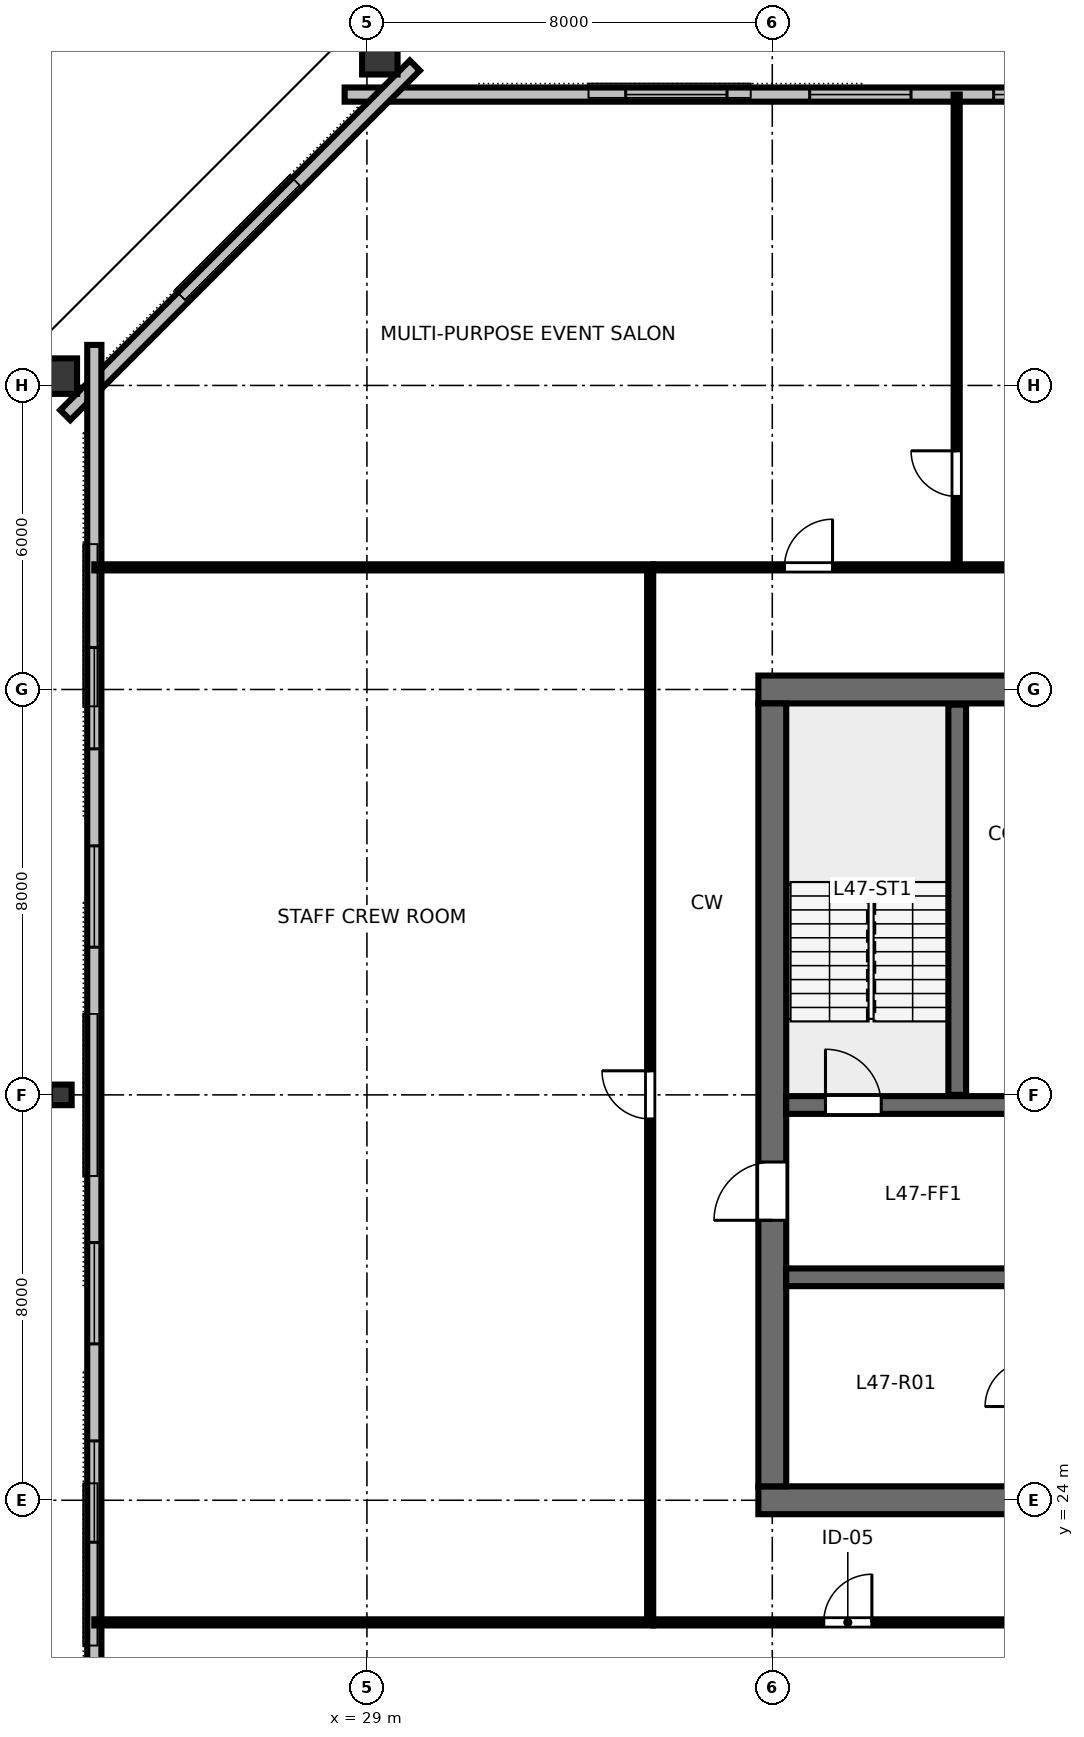
"""IFC4 building model, lengths in metres.
Left out: names, types, materials, properties, quantities, classifications, styles, units other than length and angle.
Written with IfcOpenShell. Run it as: python <this file> out.ifc"""

import sys

from ifc_helpers import new_model, si_unit, direction, frame, frame_2d, origin, origin_2d, place, context, subcontext, project, spatial, rectangle, hollow_rectangle, i_section, extrude, element, fill, save


model = new_model("IFC4")
c1 = context("Model", 3, precision=1e-05, world=origin(), true_north=direction((0.0, 1.0)))
c2 = subcontext(c1, "Body", "Model", "MODEL_VIEW")
j1 = project(units=[si_unit("LENGTHUNIT", "METRE"), si_unit("PLANEANGLEUNIT", "RADIAN")], contexts=[c1])
p1 = place(None, origin())
s1 = spatial("IfcSite", under=j1, at=p1, CompositionType="ELEMENT")
p2 = place(p1, origin())
s2 = spatial("IfcBuilding", under=s1, at=p2, CompositionType="ELEMENT")
p3 = place(p2, frame((0.0, 0.0, 180.6)))
s3 = spatial("IfcBuildingStorey", under=s2, at=p3, CompositionType="ELEMENT", Elevation=180.6)
p4 = place(p3, frame((36.725, 24.0, 0.0), z_axis=(0.0, 0.0, 1.0), x_axis=(1.0, 0.0, 0.0)))
e1 = element("IfcWall", 1, at=p4, inside=s3, PredefinedType="SHEAR", context=c2, shape_type="SweptSolid", body=[
    extrude(rectangle(XDim=18.55, YDim=0.55, at=frame_2d((9.275, 0.0))), origin(), (0.0, 0.0, 1.0), 3.36),
])
p5 = place(p4, frame((13.475, 0.0, 0.0)))
e2 = element("IfcOpeningElement", 2, at=p5, cuts=e1, PredefinedType="OPENING", context=c2, shape_type="SweptSolid", body=[
    extrude(rectangle(XDim=1.6, YDim=2.15, at=frame_2d((0.8, 1.075))), frame((0.0, 0.285, 0.0), z_axis=(0.0, -1.0, 0.0), x_axis=(1.0, 0.0, 0.0)), (0.0, 0.0, 1.0), 0.57),
])
p6 = place(p3, frame((36.725, 40.0, 0.0), z_axis=(0.0, 0.0, 1.0), x_axis=(1.0, 0.0, 0.0)))
e3 = element("IfcWall", 3, at=p6, inside=s3, PredefinedType="SHEAR", context=c2, shape_type="SweptSolid", body=[
    extrude(rectangle(XDim=18.55, YDim=0.55, at=frame_2d((9.275, 0.0))), origin(), (0.0, 0.0, 1.0), 3.36),
])
p7 = place(p6, frame((10.575, 0.0, 0.0)))
e4 = element("IfcOpeningElement", 4, at=p7, cuts=e3, PredefinedType="OPENING", context=c2, shape_type="SweptSolid", body=[
    extrude(rectangle(XDim=1.0, YDim=2.15, at=frame_2d((0.5, 1.075))), frame((0.0, 0.285, 0.0), z_axis=(0.0, -1.0, 0.0), x_axis=(1.0, 0.0, 0.0)), (0.0, 0.0, 1.0), 0.57),
])
p8 = place(p3, frame((37.0, 24.275, 0.0), z_axis=(0.0, 0.0, 1.0), x_axis=(0.0, 1.0, 0.0)))
e5 = element("IfcWall", 5, at=p8, inside=s3, PredefinedType="SHEAR", context=c2, shape_type="SweptSolid", body=[
    extrude(rectangle(XDim=15.45, YDim=0.55, at=frame_2d((7.725, 0.0))), origin(), (0.0, 0.0, 1.0), 3.36),
])
p9 = place(p8, frame((5.25, 0.0, 0.0)))
e6 = element("IfcOpeningElement", 6, at=p9, cuts=e5, PredefinedType="OPENING", context=c2, shape_type="SweptSolid", body=[
    extrude(rectangle(XDim=1.15, YDim=2.15, at=frame_2d((0.575, 1.075))), frame((0.0, 0.285, 0.0), z_axis=(0.0, -1.0, 0.0), x_axis=(1.0, 0.0, 0.0)), (0.0, 0.0, 1.0), 0.57),
])
p10 = place(p3, frame((37.275, 31.8, 0.0), z_axis=(0.0, 0.0, 1.0), x_axis=(1.0, 0.0, 0.0)))
e7 = element("IfcWall", 7, at=p10, inside=s3, PredefinedType="SHEAR", context=c2, shape_type="SweptSolid", body=[
    extrude(rectangle(XDim=17.45, YDim=0.35, at=frame_2d((8.725, 0.0))), origin(), (0.0, 0.0, 1.0), 3.36),
])
p11 = place(p10, frame((0.775, 0.0, 0.0)))
e8 = element("IfcOpeningElement", 8, at=p11, cuts=e7, PredefinedType="OPENING", context=c2, shape_type="SweptSolid", body=[
    extrude(rectangle(XDim=1.1, YDim=2.15, at=frame_2d((0.55, 1.075))), frame((0.0, 0.185, 0.0), z_axis=(0.0, -1.0, 0.0), x_axis=(1.0, 0.0, 0.0)), (0.0, 0.0, 1.0), 0.37),
])
p12 = place(p10, frame((14.675, 0.0, 0.0)))
e9 = element("IfcOpeningElement", 9, at=p12, cuts=e7, PredefinedType="OPENING", context=c2, shape_type="SweptSolid", body=[
    extrude(rectangle(XDim=1.1, YDim=2.15, at=frame_2d((0.55, 1.075))), frame((0.0, 0.185, 0.0), z_axis=(0.0, -1.0, 0.0), x_axis=(1.0, 0.0, 0.0)), (0.0, 0.0, 1.0), 0.37),
])
p13 = place(p3, frame((37.275, 28.4, 0.0), z_axis=(0.0, 0.0, 1.0), x_axis=(1.0, 0.0, 0.0)))
e10 = element("IfcWall", 10, at=p13, inside=s3, PredefinedType="SHEAR", context=c2, shape_type="SweptSolid", body=[
    extrude(rectangle(XDim=17.45, YDim=0.35, at=frame_2d((8.725, 0.0))), origin(), (0.0, 0.0, 1.0), 3.36),
])
for number, where, z_axis, x_axis in (
    (11, (29.255, 52.562, 0.0), (0.0, 0.0, 1.0), (1.0, 0.0, 0.0)),
    (12, (22.854, 46.184, 0.0), (0.0, 0.0, 1.0), (0.0, 1.0, 0.0)),
):
    element("IfcColumn", number, at=place(p3, frame(where, z_axis=z_axis, x_axis=x_axis)), inside=s3, PredefinedType="COLUMN", context=c2, shape_type="SweptSolid", body=[
        extrude(hollow_rectangle(XDim=0.7, YDim=0.85, WallThickness=0.04, at=origin_2d()), origin(), (0.0, 0.0, 1.0), 3.358),
    ])
p14 = place(p3, frame((22.96, 32.0, 0.0), z_axis=(0.0, 0.0, 1.0), x_axis=(0.0, 1.0, 0.0)))
e13 = element("IfcColumn", 13, at=p14, inside=s3, PredefinedType="COLUMN", context=c2, shape_type="SweptSolid", body=[
    extrude(i_section(OverallWidth=0.406, OverallDepth=0.425, WebThickness=0.033, FlangeThickness=0.052, FilletRadius=0.025, at=origin_2d()), origin(), (0.0, 0.0, 1.0), 3.358),
])
p15 = place(p3, frame((63.44, 51.74, 0.0), z_axis=(0.0, 0.0, 1.0), x_axis=(-1.0, 0.0, 0.0)))
e14 = element("IfcWall", 14, at=p15, inside=s3, PredefinedType="STANDARD", context=c2, shape_type="SweptSolid", body=[
    extrude(rectangle(XDim=34.88, YDim=0.28, at=frame_2d((17.44, 0.0))), origin(), (0.0, 0.0, 1.0), 3.36),
])
p16 = place(p15, frame((5.547, 0.0, 0.8)))
e15 = element("IfcOpeningElement", 15, at=p16, cuts=e14, PredefinedType="OPENING", context=c2, shape_type="SweptSolid", body=[
    extrude(rectangle(XDim=2.0, YDim=1.95, at=frame_2d((1.0, 0.975))), frame((0.0, 0.15, 0.0), z_axis=(0.0, -1.0, 0.0), x_axis=(1.0, 0.0, 0.0)), (0.0, 0.0, 1.0), 0.3),
])
p17 = place(p15, frame((9.178, 0.0, 0.8)))
e16 = element("IfcOpeningElement", 16, at=p17, cuts=e14, PredefinedType="OPENING", context=c2, shape_type="SweptSolid", body=[
    extrude(rectangle(XDim=2.0, YDim=1.95, at=frame_2d((1.0, 0.975))), frame((0.0, 0.15, 0.0), z_axis=(0.0, -1.0, 0.0), x_axis=(1.0, 0.0, 0.0)), (0.0, 0.0, 1.0), 0.3),
])
p18 = place(p15, frame((12.809, 0.0, 0.8)))
e17 = element("IfcOpeningElement", 17, at=p18, cuts=e14, PredefinedType="OPENING", context=c2, shape_type="SweptSolid", body=[
    extrude(rectangle(XDim=2.0, YDim=1.95, at=frame_2d((1.0, 0.975))), frame((0.0, 0.15, 0.0), z_axis=(0.0, -1.0, 0.0), x_axis=(1.0, 0.0, 0.0)), (0.0, 0.0, 1.0), 0.3),
])
p19 = place(p15, frame((20.071, 0.0, 0.8)))
e18 = element("IfcOpeningElement", 18, at=p19, cuts=e14, PredefinedType="OPENING", context=c2, shape_type="SweptSolid", body=[
    extrude(rectangle(XDim=2.0, YDim=1.95, at=frame_2d((1.0, 0.975))), frame((0.0, 0.15, 0.0), z_axis=(0.0, -1.0, 0.0), x_axis=(1.0, 0.0, 0.0)), (0.0, 0.0, 1.0), 0.3),
])
p20 = place(p15, frame((23.702, 0.0, 0.8)))
e19 = element("IfcOpeningElement", 19, at=p20, cuts=e14, PredefinedType="OPENING", context=c2, shape_type="SweptSolid", body=[
    extrude(rectangle(XDim=2.0, YDim=1.95, at=frame_2d((1.0, 0.975))), frame((0.0, 0.15, 0.0), z_axis=(0.0, -1.0, 0.0), x_axis=(1.0, 0.0, 0.0)), (0.0, 0.0, 1.0), 0.3),
])
p21 = place(p15, frame((27.333, 0.0, 0.8)))
e20 = element("IfcOpeningElement", 20, at=p21, cuts=e14, PredefinedType="OPENING", context=c2, shape_type="SweptSolid", body=[
    extrude(rectangle(XDim=2.0, YDim=1.95, at=frame_2d((1.0, 0.975))), frame((0.0, 0.15, 0.0), z_axis=(0.0, -1.0, 0.0), x_axis=(1.0, 0.0, 0.0)), (0.0, 0.0, 1.0), 0.3),
])
p22 = place(p3, frame((29.946, 52.314, 0.0), z_axis=(0.0, 0.0, 1.0), x_axis=(-0.707106781187, -0.707106781187, 0.0)))
e21 = element("IfcWall", 21, at=p22, inside=s3, PredefinedType="STANDARD", context=c2, shape_type="SweptSolid", body=[
    extrude(rectangle(XDim=9.757, YDim=0.28, at=frame_2d((4.879, 0.0))), origin(), (0.0, 0.0, 1.0), 3.36),
])
p23 = place(p3, frame((23.62, 46.8, 0.0), z_axis=(0.0, 0.0, 1.0), x_axis=(0.0, -1.0, 0.0)))
e22 = element("IfcWall", 22, at=p23, inside=s3, PredefinedType="STANDARD", context=c2, shape_type="SweptSolid", body=[
    extrude(rectangle(XDim=29.6, YDim=0.28, at=frame_2d((14.8, 0.0))), origin(), (0.0, 0.0, 1.0), 3.36),
])
p24 = place(p23, frame((5.971, 0.0, 0.8)))
e23 = element("IfcOpeningElement", 23, at=p24, cuts=e22, PredefinedType="OPENING", context=c2, shape_type="SweptSolid", body=[
    extrude(rectangle(XDim=2.0, YDim=1.95, at=frame_2d((1.0, 0.975))), frame((0.0, 0.15, 0.0), z_axis=(0.0, -1.0, 0.0), x_axis=(1.0, 0.0, 0.0)), (0.0, 0.0, 1.0), 0.3),
])
p25 = place(p23, frame((9.886, 0.0, 0.8)))
e24 = element("IfcOpeningElement", 24, at=p25, cuts=e22, PredefinedType="OPENING", context=c2, shape_type="SweptSolid", body=[
    extrude(rectangle(XDim=2.0, YDim=1.95, at=frame_2d((1.0, 0.975))), frame((0.0, 0.15, 0.0), z_axis=(0.0, -1.0, 0.0), x_axis=(1.0, 0.0, 0.0)), (0.0, 0.0, 1.0), 0.3),
])
p26 = place(p23, frame((17.714, 0.0, 0.8)))
e25 = element("IfcOpeningElement", 25, at=p26, cuts=e22, PredefinedType="OPENING", context=c2, shape_type="SweptSolid", body=[
    extrude(rectangle(XDim=2.0, YDim=1.95, at=frame_2d((1.0, 0.975))), frame((0.0, 0.15, 0.0), z_axis=(0.0, -1.0, 0.0), x_axis=(1.0, 0.0, 0.0)), (0.0, 0.0, 1.0), 0.3),
])
p27 = place(p23, frame((21.629, 0.0, 0.8)))
e26 = element("IfcOpeningElement", 26, at=p27, cuts=e22, PredefinedType="OPENING", context=c2, shape_type="SweptSolid", body=[
    extrude(rectangle(XDim=2.0, YDim=1.95, at=frame_2d((1.0, 0.975))), frame((0.0, 0.15, 0.0), z_axis=(0.0, -1.0, 0.0), x_axis=(1.0, 0.0, 0.0)), (0.0, 0.0, 1.0), 0.3),
])
p28 = place(p3, frame((40.65, 32.0, 0.0), z_axis=(0.0, 0.0, 1.0), x_axis=(0.0, 1.0, 0.0)))
e27 = element("IfcWall", 27, at=p28, inside=s3, PredefinedType="SHEAR", context=c2, shape_type="SweptSolid", body=[
    extrude(rectangle(XDim=7.7, YDim=0.35, at=frame_2d((3.85, 0.0))), origin(), (0.0, 0.0, 1.0), 3.6),
])
p29 = place(p3, frame((34.65, 21.59, 0.0), z_axis=(0.0, 0.0, 1.0), x_axis=(1.0, 0.0, 0.0)))
e28 = element("IfcWall", 28, at=p29, inside=s3, PredefinedType="PARTITIONING", context=c2, shape_type="SweptSolid", body=[
    extrude(rectangle(XDim=10.33, YDim=0.12, at=frame_2d((5.165, 0.0))), origin(), (0.0, 0.0, 1.0), 2.64),
])
p30 = place(p29, frame((3.365, 0.0, 0.0)))
e29 = element("IfcOpeningElement", 29, at=p30, cuts=e28, PredefinedType="OPENING", context=c2, shape_type="SweptSolid", body=[
    extrude(rectangle(XDim=0.95, YDim=2.15, at=frame_2d((0.475, 1.075))), frame((0.0, 0.07, 0.0), z_axis=(0.0, -1.0, 0.0), x_axis=(1.0, 0.0, 0.0)), (0.0, 0.0, 1.0), 0.14),
])
p31 = place(p29, frame((8.46, 0.0, 0.0)))
e30 = element("IfcOpeningElement", 30, at=p31, cuts=e28, PredefinedType="OPENING", context=c2, shape_type="SweptSolid", body=[
    extrude(rectangle(XDim=0.95, YDim=2.15, at=frame_2d((0.475, 1.075))), frame((0.0, 0.07, 0.0), z_axis=(0.0, -1.0, 0.0), x_axis=(1.0, 0.0, 0.0)), (0.0, 0.0, 1.0), 0.14),
])
p32 = place(p3, frame((40.639, 42.41, 0.0), z_axis=(0.0, 0.0, 1.0), x_axis=(0.0, 1.0, 0.0)))
e31 = element("IfcWall", 31, at=p32, inside=s3, PredefinedType="PARTITIONING", context=c2, shape_type="SweptSolid", body=[
    extrude(rectangle(XDim=9.33, YDim=0.12, at=frame_2d((4.665, 0.0))), origin(), (0.0, 0.0, 1.0), 2.64),
])
p33 = place(p32, frame((1.4, 0.0, 0.0)))
e32 = element("IfcOpeningElement", 32, at=p33, cuts=e31, PredefinedType="OPENING", context=c2, shape_type="SweptSolid", body=[
    extrude(rectangle(XDim=0.9, YDim=2.15, at=frame_2d((0.45, 1.075))), frame((0.0, 0.07, 0.0), z_axis=(0.0, -1.0, 0.0), x_axis=(1.0, 0.0, 0.0)), (0.0, 0.0, 1.0), 0.14),
])
p34 = place(p3, frame((34.65, 42.41, 0.0), z_axis=(0.0, 0.0, 1.0), x_axis=(1.0, 0.0, 0.0)))
e33 = element("IfcWall", 33, at=p34, inside=s3, PredefinedType="PARTITIONING", context=c2, shape_type="SweptSolid", body=[
    extrude(rectangle(XDim=10.33, YDim=0.12, at=frame_2d((5.165, 0.0))), origin(), (0.0, 0.0, 1.0), 2.64),
])
p35 = place(p34, frame((2.59, 0.0, 0.0)))
e34 = element("IfcOpeningElement", 34, at=p35, cuts=e33, PredefinedType="OPENING", context=c2, shape_type="SweptSolid", body=[
    extrude(rectangle(XDim=0.95, YDim=2.15, at=frame_2d((0.475, 1.075))), frame((0.0, 0.07, 0.0), z_axis=(0.0, -1.0, 0.0), x_axis=(1.0, 0.0, 0.0)), (0.0, 0.0, 1.0), 0.14),
])
p36 = place(p34, frame((7.685, 0.0, 0.0)))
e35 = element("IfcOpeningElement", 35, at=p36, cuts=e33, PredefinedType="OPENING", context=c2, shape_type="SweptSolid", body=[
    extrude(rectangle(XDim=0.95, YDim=2.15, at=frame_2d((0.475, 1.075))), frame((0.0, 0.07, 0.0), z_axis=(0.0, -1.0, 0.0), x_axis=(1.0, 0.0, 0.0)), (0.0, 0.0, 1.0), 0.14),
])
p37 = place(p3, frame((34.59, 21.65, 0.0), z_axis=(0.0, 0.0, 1.0), x_axis=(0.0, 1.0, 0.0)))
e36 = element("IfcWall", 36, at=p37, inside=s3, PredefinedType="PARTITIONING", context=c2, shape_type="SweptSolid", body=[
    extrude(rectangle(XDim=20.7, YDim=0.12, at=frame_2d((10.35, 0.0))), origin(), (0.0, 0.0, 1.0), 2.64),
])
p38 = place(p37, frame((9.875, 0.0, 0.0)))
e37 = element("IfcOpeningElement", 37, at=p38, cuts=e36, PredefinedType="OPENING", context=c2, shape_type="SweptSolid", body=[
    extrude(rectangle(XDim=0.95, YDim=2.15, at=frame_2d((0.475, 1.075))), frame((0.0, 0.07, 0.0), z_axis=(0.0, -1.0, 0.0), x_axis=(1.0, 0.0, 0.0)), (0.0, 0.0, 1.0), 0.14),
])
for number, where, z_axis, x_axis in (
    (38, (34.65, 21.59, 0.0), (0.0, 0.0, 1.0), (-1.0, 0.0, 0.0)),
    (39, (34.65, 42.41, 0.0), (0.0, 0.0, 1.0), (-1.0, 0.0, 0.0)),
):
    element("IfcWall", number, at=place(p3, frame(where, z_axis=z_axis, x_axis=x_axis)), inside=s3, PredefinedType="PARTITIONING", context=c2, shape_type="SweptSolid", body=[
        extrude(rectangle(XDim=11.03, YDim=0.12, at=frame_2d((5.515, 0.0))), origin(), (0.0, 0.0, 1.0), 2.64),
    ])
p39 = place(p19, origin())
e40 = element("IfcWindow", 40, at=p39, inside=s3, PartitioningType="SINGLE_PANEL", PredefinedType="WINDOW", context=c2, shape_type="SweptSolid", body=[
    extrude(rectangle(XDim=2.0, YDim=1.95, at=frame_2d((1.0, 0.975))), frame((0.0, 0.03, 0.0), z_axis=(0.0, -1.0, 0.0), x_axis=(1.0, 0.0, 0.0)), (0.0, 0.0, 1.0), 0.06),
])
fill(e18, e40)
p40 = place(p20, origin())
e41 = element("IfcWindow", 41, at=p40, inside=s3, PartitioningType="SINGLE_PANEL", PredefinedType="WINDOW", context=c2, shape_type="SweptSolid", body=[
    extrude(rectangle(XDim=2.0, YDim=1.95, at=frame_2d((1.0, 0.975))), frame((0.0, 0.03, 0.0), z_axis=(0.0, -1.0, 0.0), x_axis=(1.0, 0.0, 0.0)), (0.0, 0.0, 1.0), 0.06),
])
fill(e19, e41)
p41 = place(p21, origin())
e42 = element("IfcWindow", 42, at=p41, inside=s3, PartitioningType="SINGLE_PANEL", PredefinedType="WINDOW", context=c2, shape_type="SweptSolid", body=[
    extrude(rectangle(XDim=2.0, YDim=1.95, at=frame_2d((1.0, 0.975))), frame((0.0, 0.03, 0.0), z_axis=(0.0, -1.0, 0.0), x_axis=(1.0, 0.0, 0.0)), (0.0, 0.0, 1.0), 0.06),
])
fill(e20, e42)
p42 = place(p24, origin())
e43 = element("IfcWindow", 43, at=p42, inside=s3, PartitioningType="SINGLE_PANEL", PredefinedType="WINDOW", context=c2, shape_type="SweptSolid", body=[
    extrude(rectangle(XDim=2.0, YDim=1.95, at=frame_2d((1.0, 0.975))), frame((0.0, 0.03, 0.0), z_axis=(0.0, -1.0, 0.0), x_axis=(1.0, 0.0, 0.0)), (0.0, 0.0, 1.0), 0.06),
])
fill(e23, e43)
p43 = place(p25, origin())
e44 = element("IfcWindow", 44, at=p43, inside=s3, PartitioningType="SINGLE_PANEL", PredefinedType="WINDOW", context=c2, shape_type="SweptSolid", body=[
    extrude(rectangle(XDim=2.0, YDim=1.95, at=frame_2d((1.0, 0.975))), frame((0.0, 0.03, 0.0), z_axis=(0.0, -1.0, 0.0), x_axis=(1.0, 0.0, 0.0)), (0.0, 0.0, 1.0), 0.06),
])
fill(e24, e44)
p44 = place(p26, origin())
e45 = element("IfcWindow", 45, at=p44, inside=s3, PartitioningType="SINGLE_PANEL", PredefinedType="WINDOW", context=c2, shape_type="SweptSolid", body=[
    extrude(rectangle(XDim=2.0, YDim=1.95, at=frame_2d((1.0, 0.975))), frame((0.0, 0.03, 0.0), z_axis=(0.0, -1.0, 0.0), x_axis=(1.0, 0.0, 0.0)), (0.0, 0.0, 1.0), 0.06),
])
fill(e25, e45)
p45 = place(p27, origin())
e46 = element("IfcWindow", 46, at=p45, inside=s3, PartitioningType="SINGLE_PANEL", PredefinedType="WINDOW", context=c2, shape_type="SweptSolid", body=[
    extrude(rectangle(XDim=2.0, YDim=1.95, at=frame_2d((1.0, 0.975))), frame((0.0, 0.03, 0.0), z_axis=(0.0, -1.0, 0.0), x_axis=(1.0, 0.0, 0.0)), (0.0, 0.0, 1.0), 0.06),
])
fill(e26, e46)
p46 = place(p11, origin())
e47 = element("IfcDoor", 47, at=p46, inside=s3, OperationType="SINGLE_SWING_LEFT", PredefinedType="DOOR", context=c2, shape_type="SweptSolid", body=[
    extrude(rectangle(XDim=1.1, YDim=2.15, at=frame_2d((0.55, 1.075))), frame((0.0, 0.025, 0.0), z_axis=(0.0, -1.0, 0.0), x_axis=(1.0, 0.0, 0.0)), (0.0, 0.0, 1.0), 0.05),
])
fill(e8, e47)
p47 = place(p9, origin())
e48 = element("IfcDoor", 48, at=p47, inside=s3, OperationType="SINGLE_SWING_LEFT", PredefinedType="DOOR", context=c2, shape_type="SweptSolid", body=[
    extrude(rectangle(XDim=1.15, YDim=2.15, at=frame_2d((0.575, 1.075))), frame((0.0, 0.025, 0.0), z_axis=(0.0, -1.0, 0.0), x_axis=(1.0, 0.0, 0.0)), (0.0, 0.0, 1.0), 0.05),
])
fill(e6, e48)
p48 = place(p30, origin())
e49 = element("IfcDoor", 49, at=p48, inside=s3, OperationType="SINGLE_SWING_RIGHT", PredefinedType="DOOR", context=c2, shape_type="SweptSolid", body=[
    extrude(rectangle(XDim=0.95, YDim=2.15, at=frame_2d((0.475, 1.075))), frame((0.0, 0.025, 0.0), z_axis=(0.0, -1.0, 0.0), x_axis=(1.0, 0.0, 0.0)), (0.0, 0.0, 1.0), 0.05),
])
fill(e29, e49)
p49 = place(p33, origin())
e50 = element("IfcDoor", 50, at=p49, inside=s3, OperationType="SINGLE_SWING_RIGHT", PredefinedType="DOOR", context=c2, shape_type="SweptSolid", body=[
    extrude(rectangle(XDim=0.9, YDim=2.15, at=frame_2d((0.45, 1.075))), frame((0.0, 0.025, 0.0), z_axis=(0.0, -1.0, 0.0), x_axis=(1.0, 0.0, 0.0)), (0.0, 0.0, 1.0), 0.05),
])
fill(e32, e50)
p50 = place(p35, origin())
e51 = element("IfcDoor", 51, at=p50, inside=s3, OperationType="SINGLE_SWING_RIGHT", PredefinedType="DOOR", context=c2, shape_type="SweptSolid", body=[
    extrude(rectangle(XDim=0.95, YDim=2.15, at=frame_2d((0.475, 1.075))), frame((0.0, 0.025, 0.0), z_axis=(0.0, -1.0, 0.0), x_axis=(1.0, 0.0, 0.0)), (0.0, 0.0, 1.0), 0.05),
])
fill(e34, e51)
p51 = place(p38, origin())
e52 = element("IfcDoor", 52, at=p51, inside=s3, OperationType="SINGLE_SWING_RIGHT", PredefinedType="DOOR", context=c2, shape_type="SweptSolid", body=[
    extrude(rectangle(XDim=0.95, YDim=2.15, at=frame_2d((0.475, 1.075))), frame((0.0, 0.025, 0.0), z_axis=(0.0, -1.0, 0.0), x_axis=(1.0, 0.0, 0.0)), (0.0, 0.0, 1.0), 0.05),
])
fill(e37, e52)
save(model, sys.argv[1])
